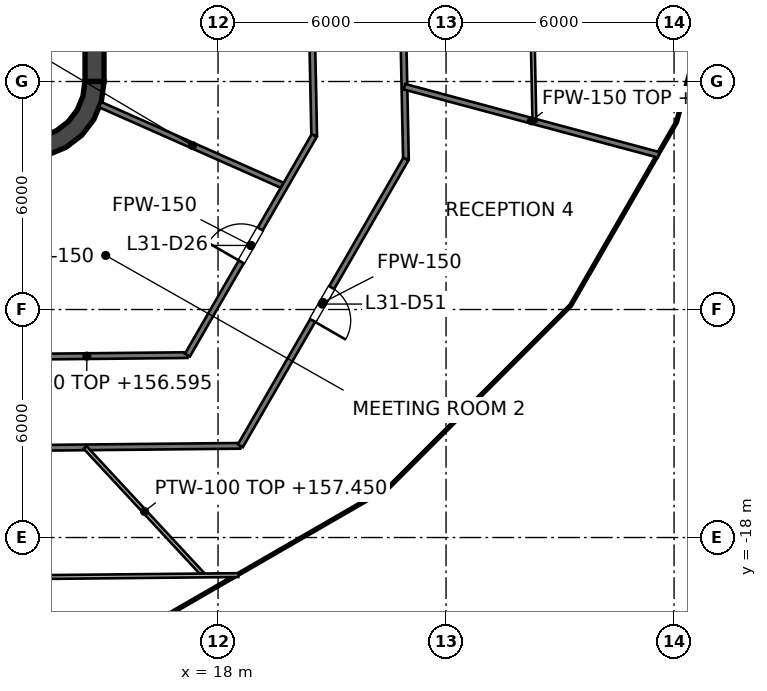
"""IFC4 building model, lengths in metres.
Left out: names, types, materials, properties, quantities, classifications, styles, units other than length and angle.
Written with IfcOpenShell. Run it as: python <this file> out.ifc"""

import sys

from ifc_helpers import new_model, si_unit, direction, frame, frame_2d, origin, place, context, subcontext, project, spatial, polyline, rectangle, outline, extrude, element, fill, save


model = new_model("IFC4")
c1 = context("Model", 3, precision=1e-05, world=origin(), true_north=direction((0.0, 1.0)))
c2 = subcontext(c1, "Body", "Model", "MODEL_VIEW")
j1 = project(units=[si_unit("LENGTHUNIT", "METRE"), si_unit("PLANEANGLEUNIT", "RADIAN")], contexts=[c1])
p1 = place(None, origin())
s1 = spatial("IfcSite", under=j1, at=p1, CompositionType="ELEMENT")
p2 = place(p1, origin())
s2 = spatial("IfcBuilding", under=s1, at=p2, CompositionType="ELEMENT")
p3 = place(p2, frame((0.0, 0.0, 153.6)))
s3 = spatial("IfcBuildingStorey", under=s2, at=p3, CompositionType="ELEMENT", Elevation=153.6)
p4 = place(p3, frame((14.75, -6.0, 0.0), z_axis=(0.0, 0.0, 1.0), x_axis=(0.0, 1.0, 0.0)))
e1 = element("IfcWall", 1, at=p4, inside=s3, PredefinedType="SHEAR", context=c2, shape_type="SweptSolid", body=[
    extrude(rectangle(XDim=12.0, YDim=0.5, at=frame_2d((6.0, 0.0))), origin(), (0.0, 0.0, 1.0), 4.0),
])
p5 = place(p3, origin())
e2 = element("IfcWall", 2, at=p5, inside=s3, PredefinedType="SHEAR", context=c2, shape_type="SweptSolid", body=[
    extrude(outline(polyline([(15.0, -6.0), (14.496, -6.0), (14.445, -6.387), (14.295, -6.748), (14.058, -7.058), (13.748, -7.295), (13.387, -7.445), (13.0, -7.496), (13.0, -8.0), (13.518, -7.932), (14.0, -7.732), (14.414, -7.414), (14.732, -7.0), (14.932, -6.518), (15.0, -6.0)])), origin(), (0.0, 0.0, 1.0), 4.0),
])
e3 = element("IfcWall", 3, at=p5, inside=s3, PredefinedType="SOLIDWALL", context=c2, shape_type="SweptSolid", body=[
    extrude(outline(polyline([(12.0, -5.675), (12.0, -5.925), (14.25, -5.925), (14.5, -5.925), (14.5, -5.675), (14.5, -3.025), (14.5, -2.775), (14.5, -0.125), (14.5, 0.125), (14.5, 2.775), (14.5, 3.025), (14.5, 5.675), (14.5, 5.925), (14.25, 5.925), (12.0, 5.925), (12.0, 5.675), (14.25, 5.675), (14.25, 3.025), (12.0, 3.025), (12.0, 2.775), (14.25, 2.775), (14.25, 0.125), (12.0, 0.125), (12.0, -0.125), (14.25, -0.125), (14.25, -2.775), (12.0, -2.775), (12.0, -3.025), (14.25, -3.025), (14.25, -5.675), (12.0, -5.675)])), origin(), (0.0, 0.0, 1.0), 3.85),
])
p6 = place(p3, frame((20.167, 10.213, 0.0), z_axis=(0.0, 0.0, 1.0), x_axis=(0.020610894613, -0.999787572949, 0.0)))
e4 = element("IfcWall", 4, at=p6, inside=s3, PredefinedType="PARTITIONING", context=c2, shape_type="SweptSolid", body=[
    extrude(rectangle(XDim=17.637, YDim=0.15, at=frame_2d((8.819, 0.0))), origin(), (0.0, 0.0, 1.0), 2.927),
])
p7 = place(p6, frame((10.508, 0.0, 0.0)))
e5 = element("IfcOpeningElement", 5, at=p7, cuts=e4, PredefinedType="OPENING", context=c2, shape_type="SweptSolid", body=[
    extrude(rectangle(XDim=1.0, YDim=2.1, at=frame_2d((0.5, 1.05))), frame((0.0, 0.075, 0.0), z_axis=(0.0, -1.0, 0.0), x_axis=(1.0, 0.0, 0.0)), (0.0, 0.0, 1.0), 0.15),
])
p8 = place(p6, frame((5.09, 0.0, 0.0)))
e6 = element("IfcOpeningElement", 6, at=p8, cuts=e4, PredefinedType="OPENING", context=c2, shape_type="SweptSolid", body=[
    extrude(rectangle(XDim=1.0, YDim=2.1, at=frame_2d((0.5, 1.05))), frame((0.0, 0.075, 0.0), z_axis=(0.0, -1.0, 0.0), x_axis=(1.0, 0.0, 0.0)), (0.0, 0.0, 1.0), 0.15),
])
p9 = place(p3, frame((22.539, 11.615, 0.0), z_axis=(0.0, 0.0, 1.0), x_axis=(0.020601506683, -0.99978776644, 0.0)))
e7 = element("IfcWall", 7, at=p9, inside=s3, PredefinedType="PARTITIONING", context=c2, shape_type="SweptSolid", body=[
    extrude(rectangle(XDim=19.66, YDim=0.15, at=frame_2d((9.83, 0.0))), origin(), (0.0, 0.0, 1.0), 2.927),
])
p10 = place(p9, frame((13.341, 0.0, 0.0)))
e8 = element("IfcOpeningElement", 8, at=p10, cuts=e7, PredefinedType="OPENING", context=c2, shape_type="SweptSolid", body=[
    extrude(rectangle(XDim=1.0, YDim=2.1, at=frame_2d((0.5, 1.05))), frame((0.0, 0.075, 0.0), z_axis=(0.0, -1.0, 0.0), x_axis=(1.0, 0.0, 0.0)), (0.0, 0.0, 1.0), 0.15),
])
p11 = place(p9, frame((3.51, 0.0, 0.0)))
e9 = element("IfcOpeningElement", 9, at=p11, cuts=e7, PredefinedType="OPENING", context=c2, shape_type="SweptSolid", body=[
    extrude(rectangle(XDim=1.0, YDim=2.1, at=frame_2d((0.5, 1.05))), frame((0.0, 0.075, 0.0), z_axis=(0.0, -1.0, 0.0), x_axis=(1.0, 0.0, 0.0)), (0.0, 0.0, 1.0), 0.15),
])
p12 = place(p3, frame((14.895, -6.607, 0.0), z_axis=(0.0, 0.0, 1.0), x_axis=(0.914233271379, -0.405188259337, 0.0)))
e10 = element("IfcWall", 10, at=p12, inside=s3, PredefinedType="PARTITIONING", context=c2, shape_type="SweptSolid", body=[
    extrude(rectangle(XDim=5.317, YDim=0.15, at=frame_2d((2.659, 0.0))), origin(), (0.0, 0.0, 1.0), 2.995),
])
p13 = place(p3, frame((22.905, -6.137, 0.0), z_axis=(0.0, 0.0, 1.0), x_axis=(0.965908688021, -0.25888299752, 0.0)))
e11 = element("IfcWall", 11, at=p13, inside=s3, PredefinedType="PARTITIONING", context=c2, shape_type="SweptSolid", body=[
    extrude(rectangle(XDim=6.922, YDim=0.15, at=frame_2d((3.461, 0.0))), origin(), (0.0, 0.0, 1.0), 3.527),
])
p14 = place(p3, frame((-14.534, -15.915, 0.0), z_axis=(0.0, 0.0, 1.0), x_axis=(0.999950930262, 0.009906415532, 0.0)))
e12 = element("IfcWall", 12, at=p14, inside=s3, PredefinedType="PARTITIONING", context=c2, shape_type="SweptSolid", body=[
    extrude(rectangle(XDim=33.123, YDim=0.15, at=frame_2d((16.561, 0.0))), origin(), (0.0, 0.0, 1.0), 2.927),
])
p15 = place(p14, frame((4.106, 0.0, 0.0)))
e13 = element("IfcOpeningElement", 13, at=p15, cuts=e12, PredefinedType="OPENING", context=c2, shape_type="SweptSolid", body=[
    extrude(rectangle(XDim=1.2, YDim=2.1, at=frame_2d((0.6, 1.05))), frame((0.0, 0.075, 0.0), z_axis=(0.0, -1.0, 0.0), x_axis=(1.0, 0.0, 0.0)), (0.0, 0.0, 1.0), 0.15),
])
p16 = place(p14, frame((10.434, 0.0, 0.0)))
e14 = element("IfcOpeningElement", 14, at=p16, cuts=e12, PredefinedType="OPENING", context=c2, shape_type="SweptSolid", body=[
    extrude(rectangle(XDim=1.0, YDim=2.1, at=frame_2d((0.5, 1.05))), frame((0.0, 0.075, 0.0), z_axis=(0.0, -1.0, 0.0), x_axis=(1.0, 0.0, 0.0)), (0.0, 0.0, 1.0), 0.15),
])
p17 = place(p14, frame((12.942, 0.0, 0.0)))
e15 = element("IfcOpeningElement", 15, at=p17, cuts=e12, PredefinedType="OPENING", context=c2, shape_type="SweptSolid", body=[
    extrude(rectangle(XDim=1.0, YDim=2.1, at=frame_2d((0.5, 1.05))), frame((0.0, 0.075, 0.0), z_axis=(0.0, -1.0, 0.0), x_axis=(1.0, 0.0, 0.0)), (0.0, 0.0, 1.0), 0.15),
])
p18 = place(p14, frame((16.111, 0.0, 0.0)))
e16 = element("IfcOpeningElement", 16, at=p18, cuts=e12, PredefinedType="OPENING", context=c2, shape_type="SweptSolid", body=[
    extrude(rectangle(XDim=1.0, YDim=2.1, at=frame_2d((0.5, 1.05))), frame((0.0, 0.075, 0.0), z_axis=(0.0, -1.0, 0.0), x_axis=(1.0, 0.0, 0.0)), (0.0, 0.0, 1.0), 0.15),
])
p19 = place(p14, frame((24.318, 0.0, 0.0)))
e17 = element("IfcOpeningElement", 17, at=p19, cuts=e12, PredefinedType="OPENING", context=c2, shape_type="SweptSolid", body=[
    extrude(rectangle(XDim=1.0, YDim=2.1, at=frame_2d((0.5, 1.05))), frame((0.0, 0.075, 0.0), z_axis=(0.0, -1.0, 0.0), x_axis=(1.0, 0.0, 0.0)), (0.0, 0.0, 1.0), 0.15),
])
p20 = place(p3, frame((11.9, -13.253, 0.0), z_axis=(0.0, 0.0, 1.0), x_axis=(0.999950853109, 0.009914200296, 0.0)))
e18 = element("IfcWall", 18, at=p20, inside=s3, PredefinedType="PARTITIONING", context=c2, shape_type="SweptSolid", body=[
    extrude(rectangle(XDim=5.294, YDim=0.15, at=frame_2d((2.647, 0.0))), origin(), (0.0, 0.0, 1.0), 2.995),
])
p21 = place(p3, frame((18.587, -15.587, 0.0), z_axis=(0.0, 0.0, 1.0), x_axis=(0.500005419212, 0.866022274979, 0.0)))
e19 = element("IfcWall", 19, at=p21, inside=s3, PredefinedType="PARTITIONING", context=c2, shape_type="SweptSolid", body=[
    extrude(rectangle(XDim=8.713, YDim=0.15, at=frame_2d((4.357, 0.0))), origin(), (0.0, 0.0, 1.0), 2.927),
])
p22 = place(p21, frame((3.808, 0.0, 0.0)))
e20 = element("IfcOpeningElement", 20, at=p22, cuts=e19, PredefinedType="OPENING", context=c2, shape_type="SweptSolid", body=[
    extrude(rectangle(XDim=1.0, YDim=2.1, at=frame_2d((0.5, 1.05))), frame((0.0, 0.075, 0.0), z_axis=(0.0, -1.0, 0.0), x_axis=(1.0, 0.0, 0.0)), (0.0, 0.0, 1.0), 0.15),
])
p23 = place(p3, frame((17.194, -13.201, 0.0), z_axis=(0.0, 0.0, 1.0), x_axis=(0.499983182885, 0.866035112932, 0.0)))
e21 = element("IfcWall", 21, at=p23, inside=s3, PredefinedType="PARTITIONING", context=c2, shape_type="SweptSolid", body=[
    extrude(rectangle(XDim=6.674, YDim=0.15, at=frame_2d((3.337, 0.0))), origin(), (0.0, 0.0, 1.0), 2.927),
])
p24 = place(p23, frame((2.834, 0.0, 0.0)))
e22 = element("IfcOpeningElement", 22, at=p24, cuts=e21, PredefinedType="OPENING", context=c2, shape_type="SweptSolid", body=[
    extrude(rectangle(XDim=1.0, YDim=2.1, at=frame_2d((0.5, 1.05))), frame((0.0, 0.075, 0.0), z_axis=(0.0, -1.0, 0.0), x_axis=(1.0, 0.0, 0.0)), (0.0, 0.0, 1.0), 0.15),
])
p25 = place(p3, frame((25.905, 13.295, 0.0), z_axis=(0.0, 0.0, 1.0), x_axis=(0.020631727872, -0.999787143249, 0.0)))
e23 = element("IfcWall", 23, at=p25, inside=s3, PredefinedType="PARTITIONING", context=c2, shape_type="SweptSolid", body=[
    extrude(rectangle(XDim=20.353, YDim=0.1, at=frame_2d((10.177, 0.0))), origin(), (0.0, 0.0, 1.0), 2.927),
])
p26 = place(p25, frame((4.737, 0.0, 0.0)))
e24 = element("IfcOpeningElement", 24, at=p26, cuts=e23, PredefinedType="OPENING", context=c2, shape_type="SweptSolid", body=[
    extrude(rectangle(XDim=0.9, YDim=2.1, at=frame_2d((0.45, 1.05))), frame((0.0, 0.05, 0.0), z_axis=(0.0, -1.0, 0.0), x_axis=(1.0, 0.0, 0.0)), (0.0, 0.0, 1.0), 0.1),
])
p27 = place(p3, frame((14.501, -15.628, 0.0), z_axis=(0.0, 0.0, 1.0), x_axis=(0.680157643832, -0.73306587667, 0.0)))
e25 = element("IfcWall", 25, at=p27, inside=s3, PredefinedType="PARTITIONING", context=c2, shape_type="SweptSolid", body=[
    extrude(rectangle(XDim=4.596, YDim=0.1, at=frame_2d((2.298, 0.0))), origin(), (0.0, 0.0, 1.0), 3.85),
])
p28 = place(p3, frame((-15.194, -19.323, 0.0), z_axis=(0.0, 0.0, 1.0), x_axis=(0.999950976029, 0.009901794681, 0.0)))
e26 = element("IfcWall", 26, at=p28, inside=s3, PredefinedType="PARTITIONING", context=c2, shape_type="SweptSolid", body=[
    extrude(rectangle(XDim=33.73, YDim=0.1, at=frame_2d((16.865, 0.0))), origin(), (0.0, 0.0, 1.0), 2.927),
])
p29 = place(p28, frame((4.043, 0.0, 0.0)))
e27 = element("IfcOpeningElement", 27, at=p29, cuts=e26, PredefinedType="OPENING", context=c2, shape_type="SweptSolid", body=[
    extrude(rectangle(XDim=0.9, YDim=2.1, at=frame_2d((0.45, 1.05))), frame((0.0, 0.05, 0.0), z_axis=(0.0, -1.0, 0.0), x_axis=(1.0, 0.0, 0.0)), (0.0, 0.0, 1.0), 0.1),
])
p30 = place(p28, frame((26.398, 0.0, 0.0)))
e28 = element("IfcOpeningElement", 28, at=p30, cuts=e26, PredefinedType="OPENING", context=c2, shape_type="SweptSolid", body=[
    extrude(rectangle(XDim=0.9, YDim=2.1, at=frame_2d((0.45, 1.05))), frame((0.0, 0.05, 0.0), z_axis=(0.0, -1.0, 0.0), x_axis=(1.0, 0.0, 0.0)), (0.0, 0.0, 1.0), 0.1),
])
p31 = place(p24, origin())
e29 = element("IfcDoor", 29, at=p31, inside=s3, OperationType="SINGLE_SWING_LEFT", PredefinedType="DOOR", context=c2, shape_type="SweptSolid", body=[
    extrude(rectangle(XDim=1.0, YDim=2.1, at=frame_2d((0.5, 1.05))), frame((0.0, 0.025, 0.0), z_axis=(0.0, -1.0, 0.0), x_axis=(1.0, 0.0, 0.0)), (0.0, 0.0, 1.0), 0.05),
])
fill(e22, e29)
p32 = place(p22, origin())
e30 = element("IfcDoor", 30, at=p32, inside=s3, OperationType="SINGLE_SWING_LEFT", PredefinedType="DOOR", context=c2, shape_type="SweptSolid", body=[
    extrude(rectangle(XDim=1.0, YDim=2.1, at=frame_2d((0.5, 1.05))), frame((0.0, 0.025, 0.0), z_axis=(0.0, -1.0, 0.0), x_axis=(1.0, 0.0, 0.0)), (0.0, 0.0, 1.0), 0.05),
])
fill(e20, e30)
save(model, sys.argv[1])
